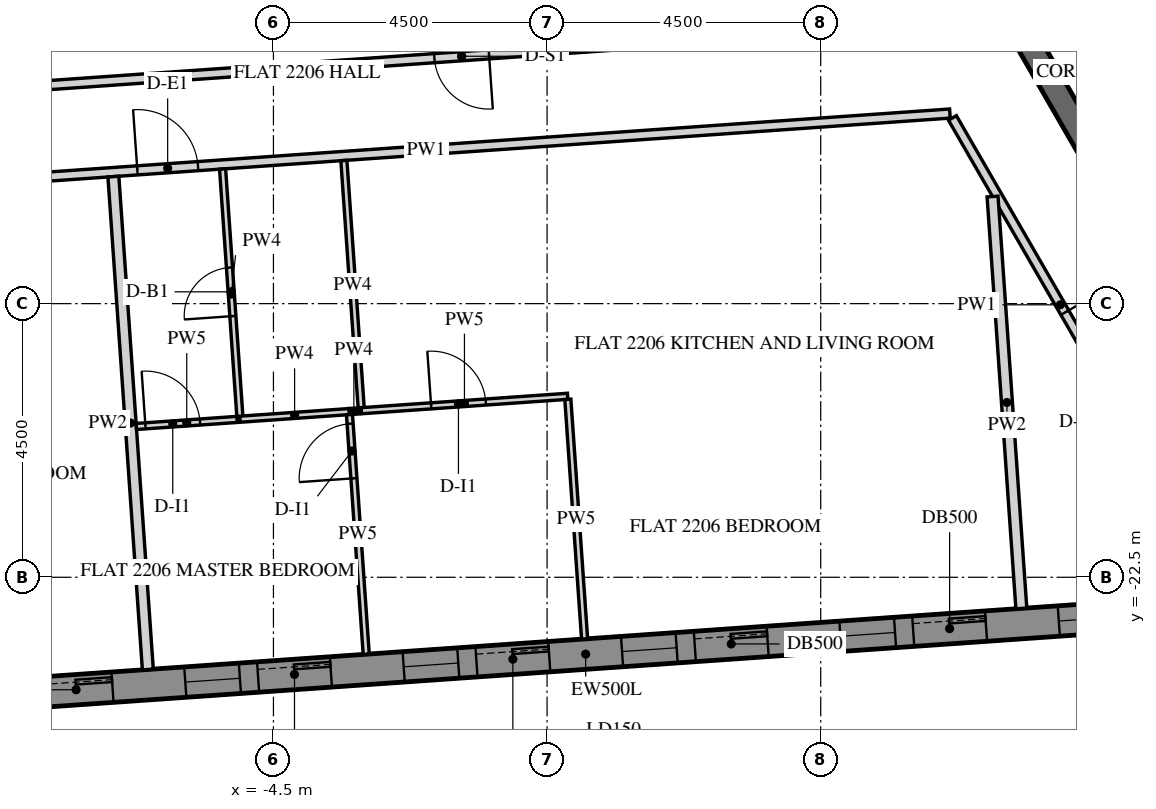
"""IFC4 building model, lengths in metres.
Left out: names, types, materials, properties, quantities, classifications, styles, units other than length and angle.
Written with IfcOpenShell. Run it as: python <this file> out.ifc"""

import sys

from ifc_helpers import new_model, si_unit, direction, frame, frame_2d, origin, place, context, subcontext, project, spatial, polyline, rectangle, outline, extrude, element, fill, save


model = new_model("IFC4")
c1 = context("Model", 3, precision=1e-05, world=origin(), true_north=direction((0.0, 1.0)))
c2 = subcontext(c1, "Body", "Model", "MODEL_VIEW")
j1 = project(units=[si_unit("LENGTHUNIT", "METRE"), si_unit("PLANEANGLEUNIT", "RADIAN")], contexts=[c1])
p1 = place(None, origin())
s1 = spatial("IfcSite", under=j1, at=p1, CompositionType="ELEMENT")
p2 = place(p1, origin())
s2 = spatial("IfcBuilding", under=s1, at=p2, CompositionType="ELEMENT")
p3 = place(p2, frame((0.0, 0.0, 279.6)))
s3 = spatial("IfcBuildingStorey", under=s2, at=p3, CompositionType="ELEMENT", Elevation=279.6)
p4 = place(p3, frame((-10.86, -24.567, -0.15), z_axis=(0.0, 0.0, 1.0), x_axis=(0.997564329317, 0.06975248292, 0.0)))
e1 = element("IfcWall", 1, at=p4, inside=s3, PredefinedType="SOLIDWALL", context=c2, shape_type="SweptSolid", body=[
    extrude(outline(polyline([(0.25, -0.25), (22.795, -0.25), (23.295, 0.25), (-0.25, 0.25), (0.25, -0.25)])), origin(), (0.0, 0.0, 1.0), 3.9),
])
p5 = place(p4, frame((1.323, 0.0, 1.05)))
e2 = element("IfcOpeningElement", 2, at=p5, cuts=e1, PredefinedType="OPENING", context=c2, shape_type="SweptSolid", body=[
    extrude(rectangle(XDim=0.9, YDim=1.5, at=frame_2d((0.45, 0.75))), frame((0.0, 0.26, 0.0), z_axis=(0.0, -1.0, 0.0), x_axis=(1.0, 0.0, 0.0)), (0.0, 0.0, 1.0), 0.52),
])
p6 = place(p4, frame((2.522, 0.0, 0.15)))
e3 = element("IfcOpeningElement", 3, at=p6, cuts=e1, PredefinedType="OPENING", context=c2, shape_type="SweptSolid", body=[
    extrude(rectangle(XDim=1.2, YDim=2.4, at=frame_2d((0.6, 1.2))), frame((0.0, 0.26, 0.0), z_axis=(0.0, -1.0, 0.0), x_axis=(1.0, 0.0, 0.0)), (0.0, 0.0, 1.0), 0.52),
])
p7 = place(p4, frame((4.922, 0.0, 1.05)))
e4 = element("IfcOpeningElement", 4, at=p7, cuts=e1, PredefinedType="OPENING", context=c2, shape_type="SweptSolid", body=[
    extrude(rectangle(XDim=0.9, YDim=1.5, at=frame_2d((0.45, 0.75))), frame((0.0, 0.26, 0.0), z_axis=(0.0, -1.0, 0.0), x_axis=(1.0, 0.0, 0.0)), (0.0, 0.0, 1.0), 0.52),
])
p8 = place(p4, frame((6.122, 0.0, 0.15)))
e5 = element("IfcOpeningElement", 5, at=p8, cuts=e1, PredefinedType="OPENING", context=c2, shape_type="SweptSolid", body=[
    extrude(rectangle(XDim=1.2, YDim=2.4, at=frame_2d((0.6, 1.2))), frame((0.0, 0.26, 0.0), z_axis=(0.0, -1.0, 0.0), x_axis=(1.0, 0.0, 0.0)), (0.0, 0.0, 1.0), 0.52),
])
p9 = place(p4, frame((8.522, 0.0, 1.05)))
e6 = element("IfcOpeningElement", 6, at=p9, cuts=e1, PredefinedType="OPENING", context=c2, shape_type="SweptSolid", body=[
    extrude(rectangle(XDim=0.9, YDim=1.5, at=frame_2d((0.45, 0.75))), frame((0.0, 0.26, 0.0), z_axis=(0.0, -1.0, 0.0), x_axis=(1.0, 0.0, 0.0)), (0.0, 0.0, 1.0), 0.52),
])
p10 = place(p4, frame((9.722, 0.0, 0.15)))
e7 = element("IfcOpeningElement", 7, at=p10, cuts=e1, PredefinedType="OPENING", context=c2, shape_type="SweptSolid", body=[
    extrude(rectangle(XDim=1.2, YDim=2.4, at=frame_2d((0.6, 1.2))), frame((0.0, 0.26, 0.0), z_axis=(0.0, -1.0, 0.0), x_axis=(1.0, 0.0, 0.0)), (0.0, 0.0, 1.0), 0.52),
])
p11 = place(p4, frame((12.122, 0.0, 1.05)))
e8 = element("IfcOpeningElement", 8, at=p11, cuts=e1, PredefinedType="OPENING", context=c2, shape_type="SweptSolid", body=[
    extrude(rectangle(XDim=0.9, YDim=1.5, at=frame_2d((0.45, 0.75))), frame((0.0, 0.26, 0.0), z_axis=(0.0, -1.0, 0.0), x_axis=(1.0, 0.0, 0.0)), (0.0, 0.0, 1.0), 0.52),
])
p12 = place(p4, frame((13.323, 0.0, 0.15)))
e9 = element("IfcOpeningElement", 9, at=p12, cuts=e1, PredefinedType="OPENING", context=c2, shape_type="SweptSolid", body=[
    extrude(rectangle(XDim=1.2, YDim=2.4, at=frame_2d((0.6, 1.2))), frame((0.0, 0.26, 0.0), z_axis=(0.0, -1.0, 0.0), x_axis=(1.0, 0.0, 0.0)), (0.0, 0.0, 1.0), 0.52),
])
p13 = place(p4, frame((15.722, 0.0, 1.05)))
e10 = element("IfcOpeningElement", 10, at=p13, cuts=e1, PredefinedType="OPENING", context=c2, shape_type="SweptSolid", body=[
    extrude(rectangle(XDim=0.9, YDim=1.5, at=frame_2d((0.45, 0.75))), frame((0.0, 0.26, 0.0), z_axis=(0.0, -1.0, 0.0), x_axis=(1.0, 0.0, 0.0)), (0.0, 0.0, 1.0), 0.52),
])
p14 = place(p4, frame((16.922, 0.0, 0.15)))
e11 = element("IfcOpeningElement", 11, at=p14, cuts=e1, PredefinedType="OPENING", context=c2, shape_type="SweptSolid", body=[
    extrude(rectangle(XDim=1.2, YDim=2.4, at=frame_2d((0.6, 1.2))), frame((0.0, 0.26, 0.0), z_axis=(0.0, -1.0, 0.0), x_axis=(1.0, 0.0, 0.0)), (0.0, 0.0, 1.0), 0.52),
])
p15 = place(p4, frame((19.323, 0.0, 1.05)))
e12 = element("IfcOpeningElement", 12, at=p15, cuts=e1, PredefinedType="OPENING", context=c2, shape_type="SweptSolid", body=[
    extrude(rectangle(XDim=0.9, YDim=1.5, at=frame_2d((0.45, 0.75))), frame((0.0, 0.26, 0.0), z_axis=(0.0, -1.0, 0.0), x_axis=(1.0, 0.0, 0.0)), (0.0, 0.0, 1.0), 0.52),
])
p16 = place(p4, frame((20.522, 0.0, 0.15)))
e13 = element("IfcOpeningElement", 13, at=p16, cuts=e1, PredefinedType="OPENING", context=c2, shape_type="SweptSolid", body=[
    extrude(rectangle(XDim=1.2, YDim=2.4, at=frame_2d((0.6, 1.2))), frame((0.0, 0.26, 0.0), z_axis=(0.0, -1.0, 0.0), x_axis=(1.0, 0.0, 0.0)), (0.0, 0.0, 1.0), 0.52),
])
p17 = place(p3, frame((6.351, -11.0, -0.15), z_axis=(0.0, 0.0, 1.0), x_axis=(0.499998894578, -0.866026041999, 0.0)))
e14 = element("IfcWall", 14, at=p17, inside=s3, PredefinedType="SHEAR", context=c2, shape_type="SweptSolid", body=[
    extrude(rectangle(XDim=15.544, YDim=0.4, at=frame_2d((7.772, 0.0))), origin(), (0.0, 0.0, 1.0), 3.9),
])
p18 = place(p17, frame((6.872, 0.0, 0.15)))
e15 = element("IfcOpeningElement", 15, at=p18, cuts=e14, PredefinedType="OPENING", context=c2, shape_type="SweptSolid", body=[
    extrude(rectangle(XDim=1.8, YDim=2.4, at=frame_2d((0.9, 1.2))), frame((0.0, 0.21, 0.0), z_axis=(0.0, -1.0, 0.0), x_axis=(1.0, 0.0, 0.0)), (0.0, 0.0, 1.0), 0.42),
])
p19 = place(p3, frame((-10.606, -16.079, 0.0), z_axis=(0.0, 0.0, 1.0), x_axis=(0.997563356349, 0.069766396426, 0.0)))
e16 = element("IfcWall", 16, at=p19, inside=s3, PredefinedType="PARTITIONING", context=c2, shape_type="SweptSolid", body=[
    extrude(rectangle(XDim=17.273, YDim=0.15, at=frame_2d((8.636, 0.0))), origin(), (0.0, 0.0, 1.0), 2.988),
])
p20 = place(p19, frame((3.877, 0.0, 0.0)))
e17 = element("IfcOpeningElement", 17, at=p20, cuts=e16, PredefinedType="OPENING", context=c2, shape_type="SweptSolid", body=[
    extrude(rectangle(XDim=1.0, YDim=2.1, at=frame_2d((0.5, 1.05))), frame((0.0, 0.085, 0.0), z_axis=(0.0, -1.0, 0.0), x_axis=(1.0, 0.0, 0.0)), (0.0, 0.0, 1.0), 0.17),
])
p21 = place(p3, frame((6.666, -14.946, 0.0), z_axis=(0.0, 0.0, 1.0), x_axis=(0.499979539361, -0.866037216418, 0.0)))
e18 = element("IfcWall", 18, at=p21, inside=s3, PredefinedType="PARTITIONING", context=c2, shape_type="SweptSolid", body=[
    extrude(rectangle(XDim=7.097, YDim=0.15, at=frame_2d((3.548, 0.0))), origin(), (0.0, 0.0, 1.0), 2.988),
])
p22 = place(p21, frame((3.696, 0.0, 0.0)))
e19 = element("IfcOpeningElement", 19, at=p22, cuts=e18, PredefinedType="OPENING", context=c2, shape_type="SweptSolid", body=[
    extrude(rectangle(XDim=1.0, YDim=2.1, at=frame_2d((0.5, 1.05))), frame((0.0, 0.085, 0.0), z_axis=(0.0, -1.0, 0.0), x_axis=(1.0, 0.0, 0.0)), (0.0, 0.0, 1.0), 0.17),
])
p23 = place(p3, frame((7.051, -13.341, 0.0), z_axis=(0.0, 0.0, 1.0), x_axis=(-0.997563599815, -0.069762915103, 0.0)))
e20 = element("IfcWall", 20, at=p23, inside=s3, PredefinedType="PARTITIONING", context=c2, shape_type="SweptSolid", body=[
    extrude(rectangle(XDim=16.952, YDim=0.15, at=frame_2d((8.476, 0.0))), origin(), (0.0, 0.0, 1.0), 2.988),
])
p24 = place(p23, frame((8.026, 0.0, 0.0)))
e21 = element("IfcOpeningElement", 21, at=p24, cuts=e20, PredefinedType="OPENING", context=c2, shape_type="SweptSolid", body=[
    extrude(rectangle(XDim=0.9, YDim=2.1, at=frame_2d((0.45, 1.05))), frame((0.0, 0.085, 0.0), z_axis=(0.0, -1.0, 0.0), x_axis=(1.0, 0.0, 0.0)), (0.0, 0.0, 1.0), 0.17),
])
p25 = place(p3, frame((-6.565, -24.017, 0.0), z_axis=(0.0, 0.0, 1.0), x_axis=(-0.069741515951, 0.997565096098, 0.0)))
e22 = element("IfcWall", 22, at=p25, inside=s3, PredefinedType="PARTITIONING", context=c2, shape_type="SweptSolid", body=[
    extrude(rectangle(XDim=8.125, YDim=0.18, at=frame_2d((4.062, 0.0))), origin(), (0.0, 0.0, 1.0), 2.988),
])
p26 = place(p3, frame((-3.342, -15.646, 0.0), z_axis=(0.0, 0.0, 1.0), x_axis=(0.069779065701, -0.997562470219, 0.0)))
e23 = element("IfcWall", 23, at=p26, inside=s3, PredefinedType="PARTITIONING", context=c2, shape_type="SweptSolid", body=[
    extrude(rectangle(XDim=4.125, YDim=0.1, at=frame_2d((2.062, 0.0))), origin(), (0.0, 0.0, 1.0), 2.988),
])
p27 = place(p3, frame((-3.056, -19.761, 0.0), z_axis=(0.0, 0.0, 1.0), x_axis=(0.997564312984, 0.069752716511, 0.0)))
e24 = element("IfcWall", 24, at=p27, inside=s3, PredefinedType="PARTITIONING", context=c2, shape_type="SweptSolid", body=[
    extrude(rectangle(XDim=3.402, YDim=0.1, at=frame_2d((1.701, 0.0))), origin(), (0.0, 0.0, 1.0), 2.988),
])
p28 = place(p27, frame((1.152, 0.0, 0.0)))
e25 = element("IfcOpeningElement", 25, at=p28, cuts=e24, PredefinedType="OPENING", context=c2, shape_type="SweptSolid", body=[
    extrude(rectangle(XDim=0.9, YDim=2.1, at=frame_2d((0.45, 1.05))), frame((0.0, 0.06, 0.0), z_axis=(0.0, -1.0, 0.0), x_axis=(1.0, 0.0, 0.0)), (0.0, 0.0, 1.0), 0.12),
])
p29 = place(p3, frame((0.342, -19.574, 0.0), z_axis=(0.0, 0.0, 1.0), x_axis=(0.06972271583, -0.997566410269, 0.0)))
e26 = element("IfcWall", 26, at=p29, inside=s3, PredefinedType="PARTITIONING", context=c2, shape_type="SweptSolid", body=[
    extrude(rectangle(XDim=3.95, YDim=0.1, at=frame_2d((1.975, 0.0))), origin(), (0.0, 0.0, 1.0), 2.988),
])
p30 = place(p3, frame((7.8, -23.012, 0.0), z_axis=(0.0, 0.0, 1.0), x_axis=(-0.069757205717, 0.997563999075, 0.0)))
e27 = element("IfcWall", 27, at=p30, inside=s3, PredefinedType="PARTITIONING", context=c2, shape_type="SweptSolid", body=[
    extrude(rectangle(XDim=6.79, YDim=0.18, at=frame_2d((3.395, 0.0))), origin(), (0.0, 0.0, 1.0), 2.988),
])
p31 = place(p3, frame((-5.049, -19.901, 0.0), z_axis=(0.0, 0.0, 1.0), x_axis=(-0.069779065701, 0.997562470219, 0.0)))
e28 = element("IfcWall", 28, at=p31, inside=s3, PredefinedType="PARTITIONING", context=c2, shape_type="SweptSolid", body=[
    extrude(rectangle(XDim=4.125, YDim=0.1, at=frame_2d((2.062, 0.0))), origin(), (0.0, 0.0, 1.0), 2.988),
])
p32 = place(p31, frame((1.7, 0.0, 0.0)))
e29 = element("IfcOpeningElement", 29, at=p32, cuts=e28, PredefinedType="OPENING", context=c2, shape_type="SweptSolid", body=[
    extrude(rectangle(XDim=0.8, YDim=2.1, at=frame_2d((0.4, 1.05))), frame((0.0, 0.06, 0.0), z_axis=(0.0, -1.0, 0.0), x_axis=(1.0, 0.0, 0.0)), (0.0, 0.0, 1.0), 0.12),
])
p33 = place(p3, frame((-6.755, -20.02, 0.0), z_axis=(0.0, 0.0, 1.0), x_axis=(0.9975627517, 0.069775041534, 0.0)))
e30 = element("IfcWall", 30, at=p33, inside=s3, PredefinedType="PARTITIONING", context=c2, shape_type="SweptSolid", body=[
    extrude(rectangle(XDim=1.662, YDim=0.1, at=frame_2d((0.831, 0.0))), origin(), (0.0, 0.0, 1.0), 2.988),
])
p34 = place(p33, frame((0.15, 0.0, 0.0)))
e31 = element("IfcOpeningElement", 31, at=p34, cuts=e30, PredefinedType="OPENING", context=c2, shape_type="SweptSolid", body=[
    extrude(rectangle(XDim=0.9, YDim=2.1, at=frame_2d((0.45, 1.05))), frame((0.0, 0.06, 0.0), z_axis=(0.0, -1.0, 0.0), x_axis=(1.0, 0.0, 0.0)), (0.0, 0.0, 1.0), 0.12),
])
p35 = place(p3, frame((-5.051, -19.901, 0.0), z_axis=(0.0, 0.0, 1.0), x_axis=(0.997562835018, 0.069773850337, 0.0)))
e32 = element("IfcWall", 32, at=p35, inside=s3, PredefinedType="PARTITIONING", context=c2, shape_type="SweptSolid", body=[
    extrude(rectangle(XDim=1.802, YDim=0.1, at=frame_2d((0.901, 0.0))), origin(), (0.0, 0.0, 1.0), 2.988),
])
p36 = place(p3, frame((-3.253, -19.775, 0.0), z_axis=(0.0, 0.0, 1.0), x_axis=(0.997499305037, 0.070676279262, 0.0)))
e33 = element("IfcWall", 33, at=p36, inside=s3, PredefinedType="PARTITIONING", context=c2, shape_type="SweptSolid", body=[
    extrude(rectangle(XDim=0.152, YDim=0.1, at=frame_2d((0.076, 0.0))), origin(), (0.0, 0.0, 1.0), 2.988),
])
p37 = place(p3, frame((-2.974, -23.765, 0.0), z_axis=(0.0, 0.0, 1.0), x_axis=(-0.069779923244, 0.997562410234, 0.0)))
e34 = element("IfcWall", 34, at=p37, inside=s3, PredefinedType="PARTITIONING", context=c2, shape_type="SweptSolid", body=[
    extrude(rectangle(XDim=3.95, YDim=0.1, at=frame_2d((1.975, 0.0))), origin(), (0.0, 0.0, 1.0), 2.988),
])
p38 = place(p37, frame((2.9, 0.0, 0.0)))
e35 = element("IfcOpeningElement", 35, at=p38, cuts=e34, PredefinedType="OPENING", context=c2, shape_type="SweptSolid", body=[
    extrude(rectangle(XDim=0.9, YDim=2.1, at=frame_2d((0.45, 1.05))), frame((0.0, 0.06, 0.0), z_axis=(0.0, -1.0, 0.0), x_axis=(1.0, 0.0, 0.0)), (0.0, 0.0, 1.0), 0.12),
])
p39 = place(p6, frame((0.0, 0.175, 0.0)))
e36 = element("IfcDoor", 36, at=p39, inside=s3, OperationType="SLIDING_TO_LEFT", PredefinedType="DOOR", context=c2, shape_type="SweptSolid", body=[
    extrude(rectangle(XDim=1.2, YDim=2.4, at=frame_2d((0.6, 1.2))), frame((0.0, 0.025, 0.0), z_axis=(0.0, -1.0, 0.0), x_axis=(1.0, 0.0, 0.0)), (0.0, 0.0, 1.0), 0.05),
])
fill(e3, e36)
p40 = place(p7, frame((0.0, 0.18, 0.0)))
e37 = element("IfcWindow", 37, at=p40, inside=s3, PartitioningType="SINGLE_PANEL", PredefinedType="WINDOW", context=c2, shape_type="SweptSolid", body=[
    extrude(rectangle(XDim=0.9, YDim=1.5, at=frame_2d((0.45, 0.75))), frame((0.0, 0.03, 0.0), z_axis=(0.0, -1.0, 0.0), x_axis=(1.0, 0.0, 0.0)), (0.0, 0.0, 1.0), 0.06),
])
fill(e4, e37)
p41 = place(p8, frame((0.0, 0.175, 0.0)))
e38 = element("IfcDoor", 38, at=p41, inside=s3, OperationType="SLIDING_TO_LEFT", PredefinedType="DOOR", context=c2, shape_type="SweptSolid", body=[
    extrude(rectangle(XDim=1.2, YDim=2.4, at=frame_2d((0.6, 1.2))), frame((0.0, 0.025, 0.0), z_axis=(0.0, -1.0, 0.0), x_axis=(1.0, 0.0, 0.0)), (0.0, 0.0, 1.0), 0.05),
])
fill(e5, e38)
p42 = place(p9, frame((0.0, 0.18, 0.0)))
e39 = element("IfcWindow", 39, at=p42, inside=s3, PartitioningType="SINGLE_PANEL", PredefinedType="WINDOW", context=c2, shape_type="SweptSolid", body=[
    extrude(rectangle(XDim=0.9, YDim=1.5, at=frame_2d((0.45, 0.75))), frame((0.0, 0.03, 0.0), z_axis=(0.0, -1.0, 0.0), x_axis=(1.0, 0.0, 0.0)), (0.0, 0.0, 1.0), 0.06),
])
fill(e6, e39)
p43 = place(p10, frame((0.0, 0.175, 0.0)))
e40 = element("IfcDoor", 40, at=p43, inside=s3, OperationType="SLIDING_TO_LEFT", PredefinedType="DOOR", context=c2, shape_type="SweptSolid", body=[
    extrude(rectangle(XDim=1.2, YDim=2.4, at=frame_2d((0.6, 1.2))), frame((0.0, 0.025, 0.0), z_axis=(0.0, -1.0, 0.0), x_axis=(1.0, 0.0, 0.0)), (0.0, 0.0, 1.0), 0.05),
])
fill(e7, e40)
p44 = place(p11, frame((0.0, 0.18, 0.0)))
e41 = element("IfcWindow", 41, at=p44, inside=s3, PartitioningType="SINGLE_PANEL", PredefinedType="WINDOW", context=c2, shape_type="SweptSolid", body=[
    extrude(rectangle(XDim=0.9, YDim=1.5, at=frame_2d((0.45, 0.75))), frame((0.0, 0.03, 0.0), z_axis=(0.0, -1.0, 0.0), x_axis=(1.0, 0.0, 0.0)), (0.0, 0.0, 1.0), 0.06),
])
fill(e8, e41)
p45 = place(p12, frame((0.0, 0.175, 0.0)))
e42 = element("IfcDoor", 42, at=p45, inside=s3, OperationType="SLIDING_TO_LEFT", PredefinedType="DOOR", context=c2, shape_type="SweptSolid", body=[
    extrude(rectangle(XDim=1.2, YDim=2.4, at=frame_2d((0.6, 1.2))), frame((0.0, 0.025, 0.0), z_axis=(0.0, -1.0, 0.0), x_axis=(1.0, 0.0, 0.0)), (0.0, 0.0, 1.0), 0.05),
])
fill(e9, e42)
p46 = place(p13, frame((0.0, 0.18, 0.0)))
e43 = element("IfcWindow", 43, at=p46, inside=s3, PartitioningType="SINGLE_PANEL", PredefinedType="WINDOW", context=c2, shape_type="SweptSolid", body=[
    extrude(rectangle(XDim=0.9, YDim=1.5, at=frame_2d((0.45, 0.75))), frame((0.0, 0.03, 0.0), z_axis=(0.0, -1.0, 0.0), x_axis=(1.0, 0.0, 0.0)), (0.0, 0.0, 1.0), 0.06),
])
fill(e10, e43)
p47 = place(p14, frame((0.0, 0.175, 0.0)))
e44 = element("IfcDoor", 44, at=p47, inside=s3, OperationType="SLIDING_TO_LEFT", PredefinedType="DOOR", context=c2, shape_type="SweptSolid", body=[
    extrude(rectangle(XDim=1.2, YDim=2.4, at=frame_2d((0.6, 1.2))), frame((0.0, 0.025, 0.0), z_axis=(0.0, -1.0, 0.0), x_axis=(1.0, 0.0, 0.0)), (0.0, 0.0, 1.0), 0.05),
])
fill(e11, e44)
p48 = place(p15, frame((0.0, 0.18, 0.0)))
e45 = element("IfcWindow", 45, at=p48, inside=s3, PartitioningType="SINGLE_PANEL", PredefinedType="WINDOW", context=c2, shape_type="SweptSolid", body=[
    extrude(rectangle(XDim=0.9, YDim=1.5, at=frame_2d((0.45, 0.75))), frame((0.0, 0.03, 0.0), z_axis=(0.0, -1.0, 0.0), x_axis=(1.0, 0.0, 0.0)), (0.0, 0.0, 1.0), 0.06),
])
fill(e12, e45)
p49 = place(p20, origin())
e46 = element("IfcDoor", 46, at=p49, inside=s3, OperationType="SINGLE_SWING_LEFT", PredefinedType="DOOR", context=c2, shape_type="SweptSolid", body=[
    extrude(rectangle(XDim=1.0, YDim=2.1, at=frame_2d((0.5, 1.05))), frame((0.0, 0.025, 0.0), z_axis=(0.0, -1.0, 0.0), x_axis=(1.0, 0.0, 0.0)), (0.0, 0.0, 1.0), 0.05),
])
fill(e17, e46)
p50 = place(p32, origin())
e47 = element("IfcDoor", 47, at=p50, inside=s3, OperationType="SINGLE_SWING_LEFT", PredefinedType="DOOR", context=c2, shape_type="SweptSolid", body=[
    extrude(rectangle(XDim=0.8, YDim=2.1, at=frame_2d((0.4, 1.05))), frame((0.0, 0.025, 0.0), z_axis=(0.0, -1.0, 0.0), x_axis=(1.0, 0.0, 0.0)), (0.0, 0.0, 1.0), 0.05),
])
fill(e29, e47)
p51 = place(p34, origin())
e48 = element("IfcDoor", 48, at=p51, inside=s3, OperationType="SINGLE_SWING_LEFT", PredefinedType="DOOR", context=c2, shape_type="SweptSolid", body=[
    extrude(rectangle(XDim=0.9, YDim=2.1, at=frame_2d((0.45, 1.05))), frame((0.0, 0.025, 0.0), z_axis=(0.0, -1.0, 0.0), x_axis=(1.0, 0.0, 0.0)), (0.0, 0.0, 1.0), 0.05),
])
fill(e31, e48)
p52 = place(p38, origin())
e49 = element("IfcDoor", 49, at=p52, inside=s3, OperationType="SINGLE_SWING_RIGHT", PredefinedType="DOOR", context=c2, shape_type="SweptSolid", body=[
    extrude(rectangle(XDim=0.9, YDim=2.1, at=frame_2d((0.45, 1.05))), frame((0.0, 0.025, 0.0), z_axis=(0.0, -1.0, 0.0), x_axis=(1.0, 0.0, 0.0)), (0.0, 0.0, 1.0), 0.05),
])
fill(e35, e49)
p53 = place(p28, origin())
e50 = element("IfcDoor", 50, at=p53, inside=s3, OperationType="SINGLE_SWING_RIGHT", PredefinedType="DOOR", context=c2, shape_type="SweptSolid", body=[
    extrude(rectangle(XDim=0.9, YDim=2.1, at=frame_2d((0.45, 1.05))), frame((0.0, 0.025, 0.0), z_axis=(0.0, -1.0, 0.0), x_axis=(1.0, 0.0, 0.0)), (0.0, 0.0, 1.0), 0.05),
])
fill(e25, e50)
p54 = place(p22, origin())
e51 = element("IfcDoor", 51, at=p54, inside=s3, OperationType="SINGLE_SWING_RIGHT", PredefinedType="DOOR", context=c2, shape_type="SweptSolid", body=[
    extrude(rectangle(XDim=1.0, YDim=2.1, at=frame_2d((0.5, 1.05))), frame((0.0, 0.025, 0.0), z_axis=(0.0, -1.0, 0.0), x_axis=(1.0, 0.0, 0.0)), (0.0, 0.0, 1.0), 0.05),
])
fill(e19, e51)
p55 = place(p24, origin())
e52 = element("IfcDoor", 52, at=p55, inside=s3, OperationType="SINGLE_SWING_LEFT", PredefinedType="DOOR", context=c2, shape_type="SweptSolid", body=[
    extrude(rectangle(XDim=0.9, YDim=2.1, at=frame_2d((0.45, 1.05))), frame((0.0, 0.025, 0.0), z_axis=(0.0, -1.0, 0.0), x_axis=(1.0, 0.0, 0.0)), (0.0, 0.0, 1.0), 0.05),
])
fill(e21, e52)
save(model, sys.argv[1])
